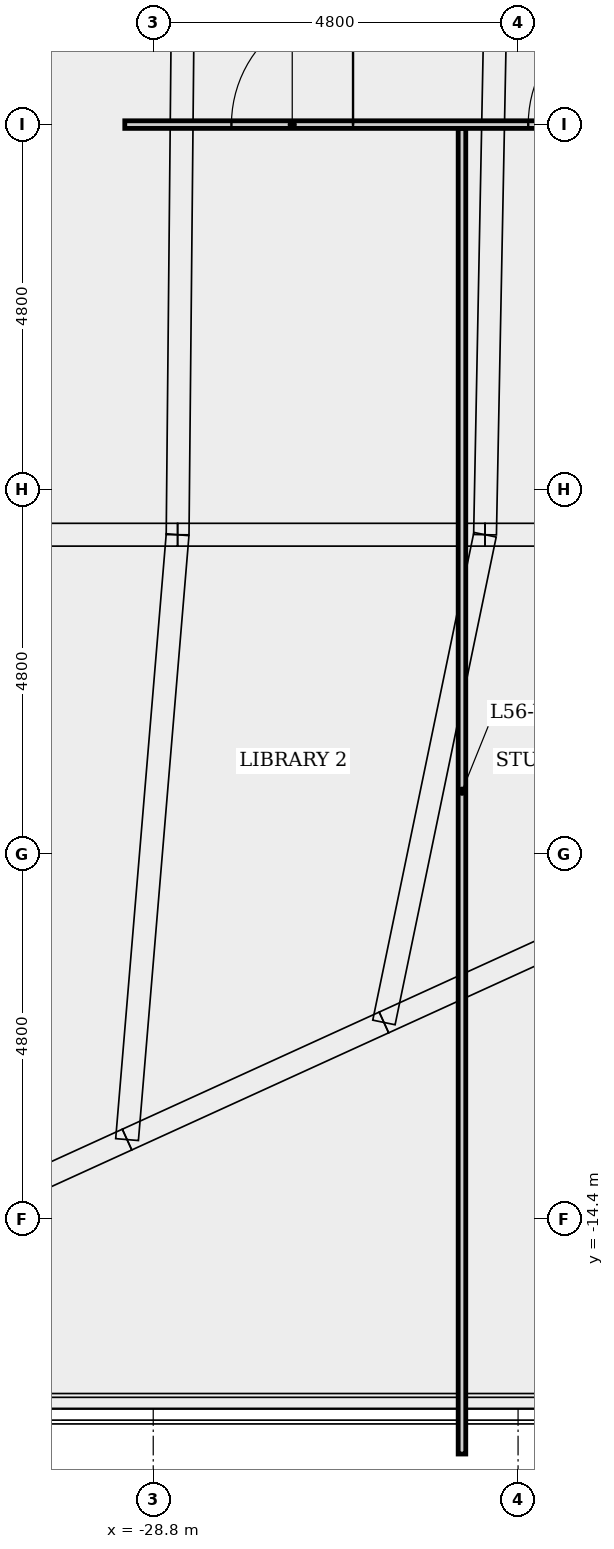
"""IFC4 building model, lengths in metres.
Left out: names, types, materials, properties, quantities, classifications, styles, units other than length and angle.
Written with IfcOpenShell. Run it as: python <this file> out.ifc"""

import sys

from ifc_helpers import new_model, si_unit, direction, frame, frame_2d, origin, place, context, subcontext, project, spatial, rectangle, extrude, element, fill, save


model = new_model("IFC4")
c1 = context("Model", 3, precision=1e-05, world=origin(), true_north=direction((0.0, 1.0)))
c2 = subcontext(c1, "Body", "Model", "MODEL_VIEW")
j1 = project(units=[si_unit("LENGTHUNIT", "METRE"), si_unit("PLANEANGLEUNIT", "RADIAN")], contexts=[c1])
p1 = place(None, origin())
s1 = spatial("IfcSite", under=j1, at=p1, CompositionType="ELEMENT")
p2 = place(p1, origin())
s2 = spatial("IfcBuilding", under=s1, at=p2, CompositionType="ELEMENT")
p3 = place(p2, frame((0.0, 0.0, 210.1)))
s3 = spatial("IfcBuildingStorey", under=s2, at=p3, CompositionType="ELEMENT", Elevation=210.1)
p4 = place(p3, frame((-24.738, -17.496, 0.0), z_axis=(0.0, 0.0, 1.0), x_axis=(0.0, 1.0, 0.0)))
e1 = element("IfcWall", 1, at=p4, inside=s3, PredefinedType="PARTITIONING", context=c2, shape_type="SweptSolid", body=[
    extrude(rectangle(XDim=17.442, YDim=0.1, at=frame_2d((8.721, 0.0))), origin(), (0.0, 0.0, 1.0), 3.275),
])
p5 = place(p3, frame((-29.174, -0.004, 0.0), z_axis=(0.0, 0.0, 1.0), x_axis=(1.0, 0.0, 0.0)))
e2 = element("IfcWall", 2, at=p5, inside=s3, PredefinedType="PARTITIONING", context=c2, shape_type="SweptSolid", body=[
    extrude(rectangle(XDim=17.949, YDim=0.1, at=frame_2d((8.975, 0.0))), origin(), (0.0, 0.0, 1.0), 3.6),
])
p6 = place(p5, frame((12.049, 0.0, 0.0)))
e3 = element("IfcOpeningElement", 3, at=p6, cuts=e2, PredefinedType="OPENING", context=c2, shape_type="SweptSolid", body=[
    extrude(rectangle(XDim=1.6, YDim=2.1, at=frame_2d((0.8, 1.05))), frame((0.0, 0.06, 0.0), z_axis=(0.0, -1.0, 0.0), x_axis=(1.0, 0.0, 0.0)), (0.0, 0.0, 1.0), 0.12),
])
p7 = place(p5, frame((8.652, 0.0, 0.0)))
e4 = element("IfcOpeningElement", 4, at=p7, cuts=e2, PredefinedType="OPENING", context=c2, shape_type="SweptSolid", body=[
    extrude(rectangle(XDim=1.6, YDim=2.1, at=frame_2d((0.8, 1.05))), frame((0.0, 0.06, 0.0), z_axis=(0.0, -1.0, 0.0), x_axis=(1.0, 0.0, 0.0)), (0.0, 0.0, 1.0), 0.12),
])
p8 = place(p5, frame((5.308, 0.0, 0.0)))
e5 = element("IfcOpeningElement", 5, at=p8, cuts=e2, PredefinedType="OPENING", context=c2, shape_type="SweptSolid", body=[
    extrude(rectangle(XDim=1.6, YDim=2.1, at=frame_2d((0.8, 1.05))), frame((0.0, 0.06, 0.0), z_axis=(0.0, -1.0, 0.0), x_axis=(1.0, 0.0, 0.0)), (0.0, 0.0, 1.0), 0.12),
])
p9 = place(p5, frame((1.403, 0.0, 0.0)))
e6 = element("IfcOpeningElement", 6, at=p9, cuts=e2, PredefinedType="OPENING", context=c2, shape_type="SweptSolid", body=[
    extrude(rectangle(XDim=1.6, YDim=2.1, at=frame_2d((0.8, 1.05))), frame((0.0, 0.06, 0.0), z_axis=(0.0, -1.0, 0.0), x_axis=(1.0, 0.0, 0.0)), (0.0, 0.0, 1.0), 0.12),
])
p10 = place(p8, origin())
e7 = element("IfcDoor", 7, at=p10, inside=s3, OperationType="SINGLE_SWING_RIGHT", PredefinedType="DOOR", context=c2, shape_type="SweptSolid", body=[
    extrude(rectangle(XDim=1.6, YDim=2.1, at=frame_2d((0.8, 1.05))), frame((0.0, 0.025, 0.0), z_axis=(0.0, -1.0, 0.0), x_axis=(1.0, 0.0, 0.0)), (0.0, 0.0, 1.0), 0.05),
])
fill(e5, e7)
p11 = place(p9, origin())
e8 = element("IfcDoor", 8, at=p11, inside=s3, OperationType="SINGLE_SWING_RIGHT", PredefinedType="DOOR", context=c2, shape_type="SweptSolid", body=[
    extrude(rectangle(XDim=1.6, YDim=2.1, at=frame_2d((0.8, 1.05))), frame((0.0, 0.025, 0.0), z_axis=(0.0, -1.0, 0.0), x_axis=(1.0, 0.0, 0.0)), (0.0, 0.0, 1.0), 0.05),
])
fill(e6, e8)
save(model, sys.argv[1])
